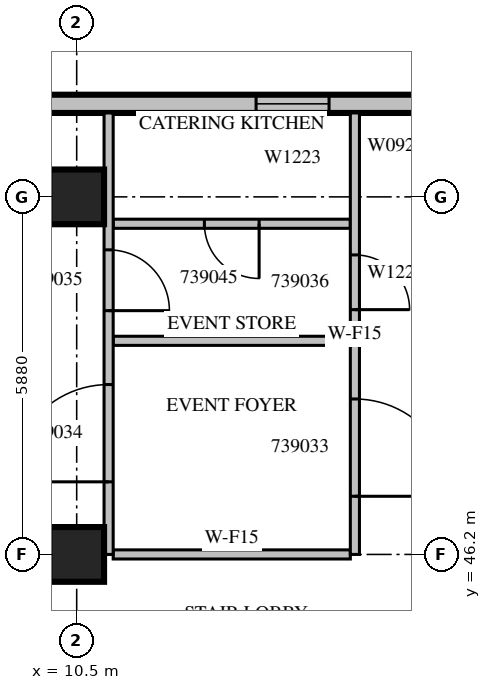
"""IFC4 building model, lengths in metres.
Left out: names, types, materials, properties, quantities, classifications, styles, units other than length and angle.
Written with IfcOpenShell. Run it as: python <this file> out.ifc"""

import sys

from ifc_helpers import new_model, si_unit, direction, frame, frame_2d, origin, origin_2d, place, context, subcontext, project, spatial, rectangle, extrude, source, transform, mapped, element, fill, save


model = new_model("IFC4")
c1 = context("Model", 3, precision=1e-05, world=origin(), true_north=direction((0.0, 1.0)))
c2 = subcontext(c1, "Body", "Model", "MODEL_VIEW")
j1 = project(units=[si_unit("LENGTHUNIT", "METRE"), si_unit("PLANEANGLEUNIT", "RADIAN")], contexts=[c1])
p1 = place(None, origin())
s1 = spatial("IfcSite", under=j1, at=p1, CompositionType="ELEMENT")
p2 = place(p1, origin())
s2 = spatial("IfcBuilding", under=s1, at=p2, CompositionType="ELEMENT")
p3 = place(p2, frame((0.0, 0.0, 181.6)))
s3 = spatial("IfcBuildingStorey", under=s2, at=p3, CompositionType="ELEMENT", Elevation=181.6)
m1 = source(origin(), c2, "Body", "SweptSolid", [
    extrude(rectangle(XDim=0.9, YDim=0.9, at=origin_2d()), origin(), (0.0, 0.0, 1.0), 3.8),
])
for number, where, z_axis, x_axis in (
    (1, (10.5, 46.2, 0.0), (0.0, 0.0, 1.0), (1.0, 0.0, 0.0)),
    (2, (10.5, 52.08, 0.0), (0.0, 0.0, 1.0), (1.0, 0.0, 0.0)),
):
    element("IfcColumn", number, at=place(p3, frame(where, z_axis=z_axis, x_axis=x_axis)), inside=s3, PredefinedType="COLUMN", context=c2, shape_type="MappedRepresentation", body=[
        mapped(m1, transform((0.0, 0.0, 0.0), scale=1.0)),
    ])
m2 = source(origin(), c2, "Body", "SweptSolid", [
    extrude(rectangle(XDim=10.5, YDim=0.3, at=frame_2d((5.25, 0.0))), origin(), (0.0, 0.0, 1.0), 3.4),
])
p4 = place(p3, frame((16.8, 53.61, 0.0), z_axis=(0.0, 0.0, 1.0), x_axis=(-1.0, 0.0, 0.0)))
e3 = element("IfcWall", 3, at=p4, inside=s3, PredefinedType="STANDARD", context=c2, shape_type="MappedRepresentation", body=[
    mapped(m2, transform((0.0, 0.0, 0.0), scale=1.0)),
])
m3 = source(origin(), c2, "Body", "SweptSolid", [
    extrude(rectangle(XDim=1.2, YDim=2.3, at=frame_2d((0.6, 1.15))), frame((0.0, 0.16, 0.0), z_axis=(0.0, -1.0, 0.0), x_axis=(1.0, 0.0, 0.0)), (0.0, 0.0, 1.0), 0.32),
])
p5 = place(p4, frame((2.15, 0.0, 0.6)))
e4 = element("IfcOpeningElement", 4, at=p5, cuts=e3, PredefinedType="OPENING", context=c2, shape_type="MappedRepresentation", body=[
    mapped(m3, transform((0.0, 0.0, 0.0), scale=1.0)),
])
m4 = source(origin(), c2, "Body", "SweptSolid", [
    extrude(rectangle(XDim=1.8, YDim=2.3, at=frame_2d((0.9, 1.15))), frame((0.0, 0.16, 0.0), z_axis=(0.0, -1.0, 0.0), x_axis=(1.0, 0.0, 0.0)), (0.0, 0.0, 1.0), 0.32),
])
p6 = place(p4, frame((8.025, 0.0, 0.6)))
e5 = element("IfcOpeningElement", 5, at=p6, cuts=e3, PredefinedType="OPENING", context=c2, shape_type="MappedRepresentation", body=[
    mapped(m4, transform((0.0, 0.0, 0.0), scale=1.0)),
])
m5 = source(origin(), c2, "Body", "SweptSolid", [
    extrude(rectangle(XDim=3.9, YDim=0.15, at=frame_2d((1.95, 0.0))), origin(), (0.0, 0.0, 1.0), 3.4),
])
p7 = place(p3, frame((15.0, 49.713, 0.0), z_axis=(0.0, 0.0, 1.0), x_axis=(-1.0, 0.0, 0.0)))
e6 = element("IfcWall", 6, at=p7, inside=s3, PredefinedType="PARTITIONING", context=c2, shape_type="MappedRepresentation", body=[
    mapped(m5, transform((0.0, 0.0, 0.0), scale=1.0)),
])
p8 = place(p3, frame((15.0, 51.638, 0.0), z_axis=(0.0, 0.0, 1.0), x_axis=(-1.0, 0.0, 0.0)))
e7 = element("IfcWall", 7, at=p8, inside=s3, PredefinedType="PARTITIONING", context=c2, shape_type="MappedRepresentation", body=[
    mapped(m5, transform((0.0, 0.0, 0.0), scale=1.0)),
])
m6 = source(origin(), c2, "Body", "SweptSolid", [
    extrude(rectangle(XDim=0.9, YDim=2.1, at=frame_2d((0.45, 1.05))), frame((0.0, 0.085, 0.0), z_axis=(0.0, -1.0, 0.0), x_axis=(1.0, 0.0, 0.0)), (0.0, 0.0, 1.0), 0.17),
])
p9 = place(p8, frame((1.5, 0.0, 0.0)))
e8 = element("IfcOpeningElement", 8, at=p9, cuts=e7, PredefinedType="OPENING", context=c2, shape_type="MappedRepresentation", body=[
    mapped(m6, transform((0.0, 0.0, 0.0), scale=1.0)),
])
p10 = place(p3, frame((15.0, 46.2, 0.0), z_axis=(0.0, 0.0, 1.0), x_axis=(-1.0, 0.0, 0.0)))
e9 = element("IfcWall", 9, at=p10, inside=s3, PredefinedType="PARTITIONING", context=c2, shape_type="MappedRepresentation", body=[
    mapped(m5, transform((0.0, 0.0, 0.0), scale=1.0)),
])
m7 = source(origin(), c2, "Body", "SweptSolid", [
    extrude(rectangle(XDim=7.26, YDim=0.15, at=frame_2d((3.63, 0.0))), origin(), (0.0, 0.0, 1.0), 3.4),
])
p11 = place(p3, frame((11.025, 46.2, 0.0), z_axis=(0.0, 0.0, 1.0), x_axis=(0.0, 1.0, 0.0)))
e10 = element("IfcWall", 10, at=p11, inside=s3, PredefinedType="PARTITIONING", context=c2, shape_type="MappedRepresentation", body=[
    mapped(m7, transform((0.0, 0.0, 0.0), scale=1.0)),
])
m8 = source(origin(), c2, "Body", "SweptSolid", [
    extrude(rectangle(XDim=1.6, YDim=2.1, at=frame_2d((0.8, 1.05))), frame((0.0, 0.085, 0.0), z_axis=(0.0, -1.0, 0.0), x_axis=(1.0, 0.0, 0.0)), (0.0, 0.0, 1.0), 0.17),
])
p12 = place(p11, frame((1.194, 0.0, 0.0)))
e11 = element("IfcOpeningElement", 11, at=p12, cuts=e10, PredefinedType="OPENING", context=c2, shape_type="MappedRepresentation", body=[
    mapped(m8, transform((0.0, 0.0, 0.0), scale=1.0)),
])
m9 = source(origin(), c2, "Body", "SweptSolid", [
    extrude(rectangle(XDim=1.0, YDim=2.1, at=frame_2d((0.5, 1.05))), frame((0.0, 0.085, 0.0), z_axis=(0.0, -1.0, 0.0), x_axis=(1.0, 0.0, 0.0)), (0.0, 0.0, 1.0), 0.17),
])
p13 = place(p11, frame((4.009, 0.0, 0.0)))
e12 = element("IfcOpeningElement", 12, at=p13, cuts=e10, PredefinedType="OPENING", context=c2, shape_type="MappedRepresentation", body=[
    mapped(m9, transform((0.0, 0.0, 0.0), scale=1.0)),
])
p14 = place(p3, frame((15.075, 46.2, 0.0), z_axis=(0.0, 0.0, 1.0), x_axis=(0.0, 1.0, 0.0)))
e13 = element("IfcWall", 13, at=p14, inside=s3, PredefinedType="PARTITIONING", context=c2, shape_type="MappedRepresentation", body=[
    mapped(m7, transform((0.0, 0.0, 0.0), scale=1.0)),
])
p15 = place(p14, frame((0.956, 0.0, 0.0)))
e14 = element("IfcOpeningElement", 14, at=p15, cuts=e13, PredefinedType="OPENING", context=c2, shape_type="MappedRepresentation", body=[
    mapped(m8, transform((0.0, 0.0, 0.0), scale=1.0)),
])
p16 = place(p14, frame((4.025, 0.0, 0.0)))
e15 = element("IfcOpeningElement", 15, at=p16, cuts=e13, PredefinedType="OPENING", context=c2, shape_type="MappedRepresentation", body=[
    mapped(m6, transform((0.0, 0.0, 0.0), scale=1.0)),
])
m10 = source(origin(), c2, "Body", "SweptSolid", [
    extrude(rectangle(XDim=1.2, YDim=2.3, at=frame_2d((0.6, 1.15))), frame((0.0, 0.03, 0.0), z_axis=(0.0, -1.0, 0.0), x_axis=(1.0, 0.0, 0.0)), (0.0, 0.0, 1.0), 0.06),
])
p17 = place(p5, origin())
e16 = element("IfcWindow", 16, at=p17, inside=s3, PartitioningType="SINGLE_PANEL", PredefinedType="WINDOW", context=c2, shape_type="MappedRepresentation", body=[
    mapped(m10, transform((0.0, 0.0, 0.0), scale=1.0)),
])
fill(e4, e16)
m11 = source(origin(), c2, "Body", "SweptSolid", [
    extrude(rectangle(XDim=1.6, YDim=2.1, at=frame_2d((0.8, 1.05))), frame((0.0, 0.025, 0.0), z_axis=(0.0, -1.0, 0.0), x_axis=(1.0, 0.0, 0.0)), (0.0, 0.0, 1.0), 0.05),
])
p18 = place(p15, origin())
e17 = element("IfcDoor", 17, at=p18, inside=s3, OperationType="SINGLE_SWING_RIGHT", PredefinedType="DOOR", context=c2, shape_type="MappedRepresentation", body=[
    mapped(m11, transform((0.0, 0.0, 0.0), scale=1.0)),
])
fill(e14, e17)
p19 = place(p12, origin())
e18 = element("IfcDoor", 18, at=p19, inside=s3, OperationType="SINGLE_SWING_LEFT", PredefinedType="DOOR", context=c2, shape_type="MappedRepresentation", body=[
    mapped(m11, transform((0.0, 0.0, 0.0), scale=1.0)),
])
fill(e11, e18)
m12 = source(origin(), c2, "Body", "SweptSolid", [
    extrude(rectangle(XDim=1.0, YDim=2.1, at=frame_2d((0.5, 1.05))), frame((0.0, 0.025, 0.0), z_axis=(0.0, -1.0, 0.0), x_axis=(1.0, 0.0, 0.0)), (0.0, 0.0, 1.0), 0.05),
])
p20 = place(p13, origin())
e19 = element("IfcDoor", 19, at=p20, inside=s3, OperationType="SINGLE_SWING_RIGHT", PredefinedType="DOOR", context=c2, shape_type="MappedRepresentation", body=[
    mapped(m12, transform((0.0, 0.0, 0.0), scale=1.0)),
])
fill(e12, e19)
m13 = source(origin(), c2, "Body", "SweptSolid", [
    extrude(rectangle(XDim=0.9, YDim=2.1, at=frame_2d((0.45, 1.05))), frame((0.0, 0.025, 0.0), z_axis=(0.0, -1.0, 0.0), x_axis=(1.0, 0.0, 0.0)), (0.0, 0.0, 1.0), 0.05),
])
p21 = place(p16, origin())
e20 = element("IfcDoor", 20, at=p21, inside=s3, OperationType="SINGLE_SWING_RIGHT", PredefinedType="DOOR", context=c2, shape_type="MappedRepresentation", body=[
    mapped(m13, transform((0.0, 0.0, 0.0), scale=1.0)),
])
fill(e15, e20)
p22 = place(p9, origin())
e21 = element("IfcDoor", 21, at=p22, inside=s3, OperationType="SINGLE_SWING_LEFT", PredefinedType="DOOR", context=c2, shape_type="MappedRepresentation", body=[
    mapped(m13, transform((0.0, 0.0, 0.0), scale=1.0)),
])
fill(e8, e21)
save(model, sys.argv[1])
